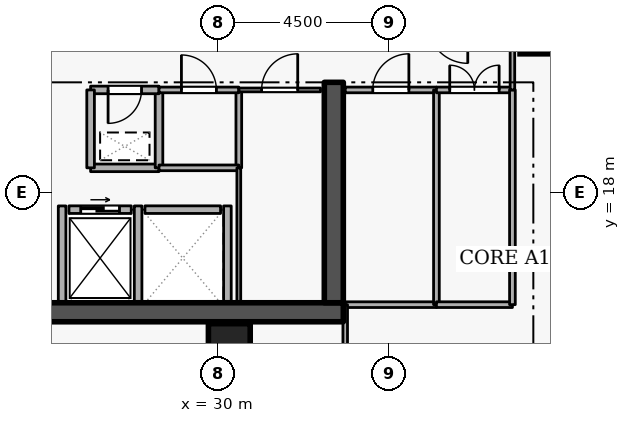
"""IFC4 building model, lengths in metres.
Left out: names, types, materials, properties, quantities, classifications, styles, units other than length and angle.
Written with IfcOpenShell. Run it as: python <this file> out.ifc"""

import sys

from ifc_helpers import new_model, si_unit, direction, frame, frame_2d, origin, origin_2d, place, context, subcontext, project, spatial, rectangle, extrude, element, fill, save


model = new_model("IFC4")
c1 = context("Model", 3, precision=1e-05, world=origin(), true_north=direction((0.0, 1.0)))
c2 = subcontext(c1, "Body", "Model", "MODEL_VIEW")
j1 = project(units=[si_unit("LENGTHUNIT", "METRE"), si_unit("PLANEANGLEUNIT", "RADIAN")], contexts=[c1])
p1 = place(None, origin())
s1 = spatial("IfcSite", under=j1, at=p1, CompositionType="ELEMENT")
p2 = place(p1, origin())
s2 = spatial("IfcBuilding", under=s1, at=p2, CompositionType="ELEMENT")
p3 = place(p2, frame((0.0, 0.0, 167.1)))
s3 = spatial("IfcBuildingStorey", under=s2, at=p3, CompositionType="ELEMENT", Elevation=167.1)
p4 = place(p3, frame((17.7, 14.85, 0.0), z_axis=(0.0, 0.0, 1.0), x_axis=(1.0, 0.0, 0.0)))
e1 = element("IfcWall", 1, at=p4, inside=s3, PredefinedType="SHEAR", context=c2, shape_type="SweptSolid", body=[
    extrude(rectangle(XDim=15.6, YDim=0.5, at=frame_2d((7.8, 0.0))), origin(), (0.0, 0.0, 1.0), 3.6),
])
p5 = place(p3, frame((33.05, 15.1, 0.0), z_axis=(0.0, 0.0, 1.0), x_axis=(0.0, 1.0, 0.0)))
e2 = element("IfcWall", 2, at=p5, inside=s3, PredefinedType="SHEAR", context=c2, shape_type="SweptSolid", body=[
    extrude(rectangle(XDim=5.8, YDim=0.5, at=frame_2d((2.9, 0.0))), origin(), (0.0, 0.0, 1.0), 3.6),
])
for number, where, z_axis, x_axis in (
    (3, (38.5, 22.2, 0.0), (0.0, 0.0, 1.0), (1.0, 0.0, 0.0)),
    (4, (30.3, 14.0, 0.0), (0.0, 0.0, 1.0), (1.0, 0.0, 0.0)),
):
    element("IfcColumn", number, at=place(p3, frame(where, z_axis=z_axis, x_axis=x_axis)), inside=s3, PredefinedType="COLUMN", context=c2, shape_type="SweptSolid", body=[
        extrude(rectangle(XDim=1.1, YDim=1.1, at=origin_2d()), origin(), (0.0, 0.0, 1.0), 3.6),
    ])
p6 = place(p3, frame((26.08, 17.55, 0.0), z_axis=(0.0, 0.0, 1.0), x_axis=(1.0, 0.0, 0.0)))
e5 = element("IfcWall", 5, at=p6, inside=s3, PredefinedType="STANDARD", context=c2, shape_type="SweptSolid", body=[
    extrude(rectangle(XDim=1.64, YDim=0.2, at=frame_2d((0.82, 0.0))), origin(), (0.0, 0.0, 1.0), 3.34),
])
p7 = place(p6, frame((0.31, 0.0, 0.0)))
e6 = element("IfcOpeningElement", 6, at=p7, cuts=e5, PredefinedType="OPENING", context=c2, shape_type="SweptSolid", body=[
    extrude(rectangle(XDim=1.02, YDim=2.06, at=frame_2d((0.51, 1.03))), frame((0.0, 0.11, 0.0), z_axis=(0.0, -1.0, 0.0), x_axis=(1.0, 0.0, 0.0)), (0.0, 0.0, 1.0), 0.22),
])
p8 = place(p3, frame((28.08, 17.55, 0.0), z_axis=(0.0, 0.0, 1.0), x_axis=(1.0, 0.0, 0.0)))
e7 = element("IfcWall", 7, at=p8, inside=s3, PredefinedType="STANDARD", context=c2, shape_type="SweptSolid", body=[
    extrude(rectangle(XDim=1.99, YDim=0.2, at=frame_2d((0.995, 0.0))), origin(), (0.0, 0.0, 1.0), 3.34),
])
for number, where, z_axis, x_axis in (
    (8, (27.9, 15.112, 0.0), (0.0, 0.0, 1.0), (0.0, 1.0, 0.0)),
    (9, (25.9, 15.112, 0.0), (0.0, 0.0, 1.0), (0.0, 1.0, 0.0)),
    (10, (30.25, 15.112, 0.0), (0.0, 0.0, 1.0), (0.0, 1.0, 0.0)),
):
    element("IfcWall", number, at=place(p3, frame(where, z_axis=z_axis, x_axis=x_axis)), inside=s3, PredefinedType="STANDARD", context=c2, shape_type="SweptSolid", body=[
        extrude(rectangle(XDim=2.536, YDim=0.2, at=frame_2d((1.268, 0.0))), origin(), (0.0, 0.0, 1.0), 3.34),
    ])
p9 = place(p3, frame((26.65, 18.65, 0.0), z_axis=(0.0, 0.0, 1.0), x_axis=(1.0, 0.0, 0.0)))
e11 = element("IfcWall", 11, at=p9, inside=s3, PredefinedType="STANDARD", context=c2, shape_type="SweptSolid", body=[
    extrude(rectangle(XDim=1.8, YDim=0.2, at=frame_2d((0.9, 0.0))), origin(), (0.0, 0.0, 1.0), 3.34),
])
p10 = place(p3, frame((28.45, 18.65, 0.0), z_axis=(0.0, 0.0, 1.0), x_axis=(0.0, 1.0, 0.0)))
e12 = element("IfcWall", 12, at=p10, inside=s3, PredefinedType="STANDARD", context=c2, shape_type="SweptSolid", body=[
    extrude(rectangle(XDim=2.05, YDim=0.2, at=frame_2d((1.025, 0.0))), origin(), (0.0, 0.0, 1.0), 3.34),
])
p11 = place(p3, frame((28.45, 20.7, 0.0), z_axis=(0.0, 0.0, 1.0), x_axis=(-1.0, 0.0, 0.0)))
e13 = element("IfcWall", 13, at=p11, inside=s3, PredefinedType="STANDARD", context=c2, shape_type="SweptSolid", body=[
    extrude(rectangle(XDim=1.8, YDim=0.2, at=frame_2d((0.9, 0.0))), origin(), (0.0, 0.0, 1.0), 3.34),
])
p12 = place(p11, frame((0.46, 0.0, 0.0)))
e14 = element("IfcOpeningElement", 14, at=p12, cuts=e13, PredefinedType="OPENING", context=c2, shape_type="SweptSolid", body=[
    extrude(rectangle(XDim=0.88, YDim=2.04, at=frame_2d((0.44, 1.02))), frame((0.0, 0.11, 0.0), z_axis=(0.0, -1.0, 0.0), x_axis=(1.0, 0.0, 0.0)), (0.0, 0.0, 1.0), 0.22),
])
p13 = place(p3, frame((26.65, 20.7, 0.0), z_axis=(0.0, 0.0, 1.0), x_axis=(0.0, -1.0, 0.0)))
e15 = element("IfcWall", 15, at=p13, inside=s3, PredefinedType="STANDARD", context=c2, shape_type="SweptSolid", body=[
    extrude(rectangle(XDim=2.05, YDim=0.2, at=frame_2d((1.025, 0.0))), origin(), (0.0, 0.0, 1.0), 3.34),
])
p14 = place(p3, frame((30.55, 20.7, 0.0), z_axis=(0.0, 0.0, 1.0), x_axis=(0.0, -1.0, 0.0)))
e16 = element("IfcWall", 16, at=p14, inside=s3, PredefinedType="PARTITIONING", context=c2, shape_type="SweptSolid", body=[
    extrude(rectangle(XDim=2.05, YDim=0.15, at=frame_2d((1.025, 0.0))), origin(), (0.0, 0.0, 1.0), 3.34),
])
p15 = place(p3, frame((30.55, 18.65, 0.0), z_axis=(0.0, 0.0, 1.0), x_axis=(-1.0, 0.0, 0.0)))
e17 = element("IfcWall", 17, at=p15, inside=s3, PredefinedType="PARTITIONING", context=c2, shape_type="SweptSolid", body=[
    extrude(rectangle(XDim=2.1, YDim=0.15, at=frame_2d((1.05, 0.0))), origin(), (0.0, 0.0, 1.0), 3.34),
])
p16 = place(p3, frame((28.45, 20.7, 0.0), z_axis=(0.0, 0.0, 1.0), x_axis=(1.0, 0.0, 0.0)))
e18 = element("IfcWall", 18, at=p16, inside=s3, PredefinedType="PARTITIONING", context=c2, shape_type="SweptSolid", body=[
    extrude(rectangle(XDim=2.1, YDim=0.15, at=frame_2d((1.05, 0.0))), origin(), (0.0, 0.0, 1.0), 3.34),
])
p17 = place(p16, frame((0.59, 0.0, 0.0)))
e19 = element("IfcOpeningElement", 19, at=p17, cuts=e18, PredefinedType="OPENING", context=c2, shape_type="SweptSolid", body=[
    extrude(rectangle(XDim=0.92, YDim=2.08, at=frame_2d((0.46, 1.04))), frame((0.0, 0.085, 0.0), z_axis=(0.0, -1.0, 0.0), x_axis=(1.0, 0.0, 0.0)), (0.0, 0.0, 1.0), 0.17),
])
p18 = place(p3, frame((30.55, 15.1, 0.0), z_axis=(0.0, 0.0, 1.0), x_axis=(0.0, 1.0, 0.0)))
e20 = element("IfcWall", 20, at=p18, inside=s3, PredefinedType="PARTITIONING", context=c2, shape_type="SweptSolid", body=[
    extrude(rectangle(XDim=3.55, YDim=0.1, at=frame_2d((1.775, 0.0))), origin(), (0.0, 0.0, 1.0), 3.34),
])
p19 = place(p3, frame((30.55, 20.7, 0.0), z_axis=(0.0, 0.0, 1.0), x_axis=(1.0, 0.0, 0.0)))
e21 = element("IfcWall", 21, at=p19, inside=s3, PredefinedType="PARTITIONING", context=c2, shape_type="SweptSolid", body=[
    extrude(rectangle(XDim=2.15, YDim=0.1, at=frame_2d((1.075, 0.0))), origin(), (0.0, 0.0, 1.0), 3.34),
])
p20 = place(p19, frame((0.6, 0.0, 0.0)))
e22 = element("IfcOpeningElement", 22, at=p20, cuts=e21, PredefinedType="OPENING", context=c2, shape_type="SweptSolid", body=[
    extrude(rectangle(XDim=0.95, YDim=2.1, at=frame_2d((0.475, 1.05))), frame((0.0, 0.06, 0.0), z_axis=(0.0, -1.0, 0.0), x_axis=(1.0, 0.0, 0.0)), (0.0, 0.0, 1.0), 0.12),
])
p21 = place(p3, frame((35.75, 15.05, 0.0), z_axis=(0.0, 0.0, 1.0), x_axis=(-1.0, 0.0, 0.0)))
e23 = element("IfcWall", 23, at=p21, inside=s3, PredefinedType="PARTITIONING", context=c2, shape_type="SweptSolid", body=[
    extrude(rectangle(XDim=2.4, YDim=0.15, at=frame_2d((1.2, 0.0))), origin(), (0.0, 0.0, 1.0), 3.34),
])
p22 = place(p3, frame((33.35, 20.7, 0.0), z_axis=(0.0, 0.0, 1.0), x_axis=(1.0, 0.0, 0.0)))
e24 = element("IfcWall", 24, at=p22, inside=s3, PredefinedType="PARTITIONING", context=c2, shape_type="SweptSolid", body=[
    extrude(rectangle(XDim=2.4, YDim=0.15, at=frame_2d((1.2, 0.0))), origin(), (0.0, 0.0, 1.0), 3.34),
])
p23 = place(p22, frame((0.725, 0.0, 0.0)))
e25 = element("IfcOpeningElement", 25, at=p23, cuts=e24, PredefinedType="OPENING", context=c2, shape_type="SweptSolid", body=[
    extrude(rectangle(XDim=0.95, YDim=2.1, at=frame_2d((0.475, 1.05))), frame((0.0, 0.085, 0.0), z_axis=(0.0, -1.0, 0.0), x_axis=(1.0, 0.0, 0.0)), (0.0, 0.0, 1.0), 0.17),
])
p24 = place(p3, frame((35.75, 20.7, 0.0), z_axis=(0.0, 0.0, 1.0), x_axis=(0.0, -1.0, 0.0)))
e26 = element("IfcWall", 26, at=p24, inside=s3, PredefinedType="PARTITIONING", context=c2, shape_type="SweptSolid", body=[
    extrude(rectangle(XDim=5.65, YDim=0.15, at=frame_2d((2.825, 0.0))), origin(), (0.0, 0.0, 1.0), 3.34),
])
p25 = place(p3, frame((37.75, 15.05, 0.0), z_axis=(0.0, 0.0, 1.0), x_axis=(-1.0, 0.0, 0.0)))
e27 = element("IfcWall", 27, at=p25, inside=s3, PredefinedType="PARTITIONING", context=c2, shape_type="SweptSolid", body=[
    extrude(rectangle(XDim=2.0, YDim=0.15, at=frame_2d((1.0, 0.0))), origin(), (0.0, 0.0, 1.0), 3.34),
])
p26 = place(p3, frame((35.75, 20.7, 0.0), z_axis=(0.0, 0.0, 1.0), x_axis=(1.0, 0.0, 0.0)))
e28 = element("IfcWall", 28, at=p26, inside=s3, PredefinedType="PARTITIONING", context=c2, shape_type="SweptSolid", body=[
    extrude(rectangle(XDim=2.0, YDim=0.15, at=frame_2d((1.0, 0.0))), origin(), (0.0, 0.0, 1.0), 3.34),
])
p27 = place(p26, frame((0.35, 0.0, 0.0)))
e29 = element("IfcOpeningElement", 29, at=p27, cuts=e28, PredefinedType="OPENING", context=c2, shape_type="SweptSolid", body=[
    extrude(rectangle(XDim=1.3, YDim=2.12, at=frame_2d((0.65, 1.06))), frame((0.0, 0.085, 0.0), z_axis=(0.0, -1.0, 0.0), x_axis=(1.0, 0.0, 0.0)), (0.0, 0.0, 1.0), 0.17),
])
p28 = place(p3, frame((37.75, 20.7, 0.0), z_axis=(0.0, 0.0, 1.0), x_axis=(0.0, -1.0, 0.0)))
e30 = element("IfcWall", 30, at=p28, inside=s3, PredefinedType="PARTITIONING", context=c2, shape_type="SweptSolid", body=[
    extrude(rectangle(XDim=5.65, YDim=0.15, at=frame_2d((2.825, 0.0))), origin(), (0.0, 0.0, 1.0), 3.34),
])
p29 = place(p3, frame((33.35, 3.28, 0.0), z_axis=(0.0, 0.0, 1.0), x_axis=(0.0, 1.0, 0.0)))
e31 = element("IfcWall", 31, at=p29, inside=s3, PredefinedType="PARTITIONING", context=c2, shape_type="SweptSolid", body=[
    extrude(rectangle(XDim=11.77, YDim=0.12, at=frame_2d((5.885, 0.0))), origin(), (0.0, 0.0, 1.0), 2.545),
])
p30 = place(p3, frame((37.75, 20.7, 0.0), z_axis=(0.0, 0.0, 1.0), x_axis=(0.0, 1.0, 0.0)))
e32 = element("IfcWall", 32, at=p30, inside=s3, PredefinedType="PARTITIONING", context=c2, shape_type="SweptSolid", body=[
    extrude(rectangle(XDim=1.75, YDim=0.12, at=frame_2d((0.875, 0.0))), origin(), (0.0, 0.0, 1.0), 3.34),
])
p31 = place(p7, origin())
e33 = element("IfcDoor", 33, at=p31, inside=s3, OperationType="SLIDING_TO_LEFT", PredefinedType="DOOR", context=c2, shape_type="SweptSolid", body=[
    extrude(rectangle(XDim=1.02, YDim=2.06, at=frame_2d((0.51, 1.03))), frame((0.0, 0.025, 0.0), z_axis=(0.0, -1.0, 0.0), x_axis=(1.0, 0.0, 0.0)), (0.0, 0.0, 1.0), 0.05),
])
fill(e6, e33)
p32 = place(p12, origin())
e34 = element("IfcDoor", 34, at=p32, inside=s3, OperationType="SINGLE_SWING_RIGHT", PredefinedType="DOOR", context=c2, shape_type="SweptSolid", body=[
    extrude(rectangle(XDim=0.88, YDim=2.04, at=frame_2d((0.44, 1.02))), frame((0.0, 0.025, 0.0), z_axis=(0.0, -1.0, 0.0), x_axis=(1.0, 0.0, 0.0)), (0.0, 0.0, 1.0), 0.05),
])
fill(e14, e34)
p33 = place(p17, origin())
e35 = element("IfcDoor", 35, at=p33, inside=s3, OperationType="SINGLE_SWING_LEFT", PredefinedType="DOOR", context=c2, shape_type="SweptSolid", body=[
    extrude(rectangle(XDim=0.92, YDim=2.08, at=frame_2d((0.46, 1.04))), frame((0.0, 0.025, 0.0), z_axis=(0.0, -1.0, 0.0), x_axis=(1.0, 0.0, 0.0)), (0.0, 0.0, 1.0), 0.05),
])
fill(e19, e35)
p34 = place(p20, origin())
e36 = element("IfcDoor", 36, at=p34, inside=s3, OperationType="SINGLE_SWING_RIGHT", PredefinedType="DOOR", context=c2, shape_type="SweptSolid", body=[
    extrude(rectangle(XDim=0.95, YDim=2.1, at=frame_2d((0.475, 1.05))), frame((0.0, 0.025, 0.0), z_axis=(0.0, -1.0, 0.0), x_axis=(1.0, 0.0, 0.0)), (0.0, 0.0, 1.0), 0.05),
])
fill(e22, e36)
p35 = place(p23, origin())
e37 = element("IfcDoor", 37, at=p35, inside=s3, OperationType="SINGLE_SWING_RIGHT", PredefinedType="DOOR", context=c2, shape_type="SweptSolid", body=[
    extrude(rectangle(XDim=0.95, YDim=2.1, at=frame_2d((0.475, 1.05))), frame((0.0, 0.025, 0.0), z_axis=(0.0, -1.0, 0.0), x_axis=(1.0, 0.0, 0.0)), (0.0, 0.0, 1.0), 0.05),
])
fill(e25, e37)
p36 = place(p27, origin())
e38 = element("IfcDoor", 38, at=p36, inside=s3, OperationType="DOUBLE_DOOR_SINGLE_SWING", PredefinedType="DOOR", context=c2, shape_type="SweptSolid", body=[
    extrude(rectangle(XDim=1.3, YDim=2.12, at=frame_2d((0.65, 1.06))), frame((0.0, 0.025, 0.0), z_axis=(0.0, -1.0, 0.0), x_axis=(1.0, 0.0, 0.0)), (0.0, 0.0, 1.0), 0.05),
])
fill(e29, e38)
save(model, sys.argv[1])
